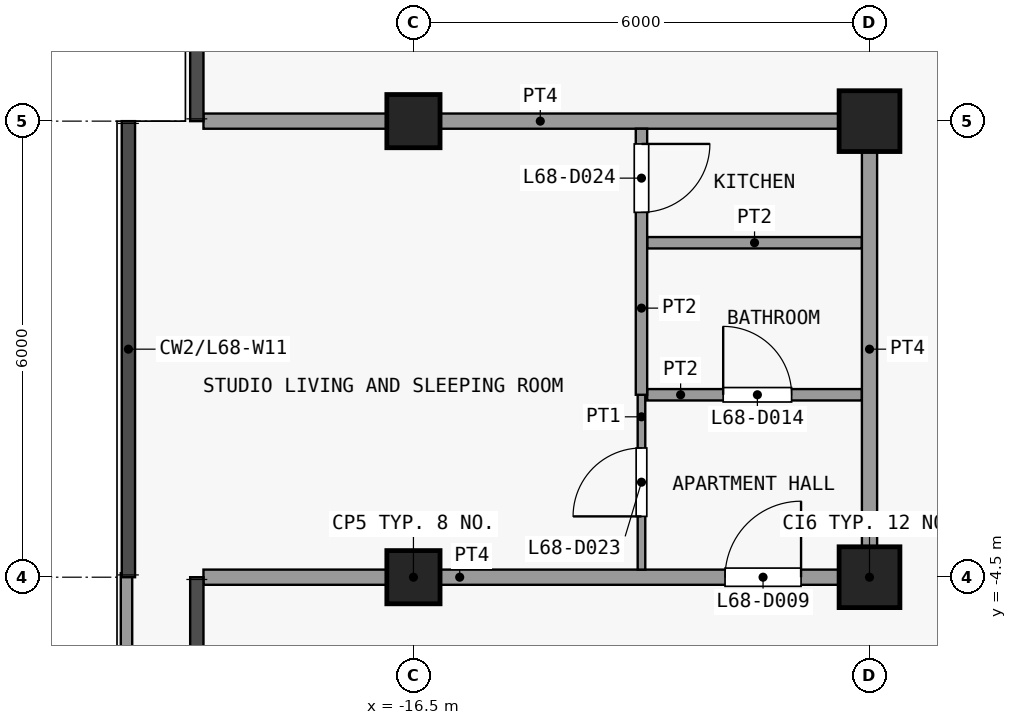
"""IFC4 building model, lengths in metres.
Left out: names, types, materials, properties, quantities, classifications, styles, units other than length and angle.
Written with IfcOpenShell. Run it as: python <this file> out.ifc"""

import sys

from ifc_helpers import new_model, si_unit, direction, frame, frame_2d, origin, origin_2d, place, context, subcontext, project, spatial, rectangle, extrude, element, fill, save


model = new_model("IFC4")
c1 = context("Model", 3, precision=1e-05, world=origin(), true_north=direction((0.0, 1.0)))
c2 = subcontext(c1, "Body", "Model", "MODEL_VIEW")
j1 = project(units=[si_unit("LENGTHUNIT", "METRE"), si_unit("PLANEANGLEUNIT", "RADIAN")], contexts=[c1])
p1 = place(None, origin())
s1 = spatial("IfcSite", under=j1, at=p1, CompositionType="ELEMENT")
p2 = place(p1, origin())
s2 = spatial("IfcBuilding", under=s1, at=p2, CompositionType="ELEMENT")
p3 = place(p2, frame((0.0, 0.0, 269.9)))
s3 = spatial("IfcBuildingStorey", under=s2, at=p3, CompositionType="ELEMENT", Elevation=269.9)
for number, where, z_axis, x_axis in (
    (1, (-16.5, -4.5, 0.0), (0.0, 0.0, 1.0), (1.0, 0.0, 0.0)),
    (2, (-16.5, 1.5, 0.0), (0.0, 0.0, 1.0), (1.0, 0.0, 0.0)),
):
    element("IfcColumn", number, at=place(p3, frame(where, z_axis=z_axis, x_axis=x_axis)), inside=s3, PredefinedType="COLUMN", context=c2, shape_type="SweptSolid", body=[
        extrude(rectangle(XDim=0.7, YDim=0.7, at=origin_2d()), origin(), (0.0, 0.0, 1.0), 3.6),
    ])
for number, where, z_axis, x_axis in (
    (3, (-10.5, -4.5, 0.0), (0.0, 0.0, 1.0), (1.0, 0.0, 0.0)),
    (4, (-10.5, 1.5, 0.0), (0.0, 0.0, 1.0), (1.0, 0.0, 0.0)),
):
    element("IfcColumn", number, at=place(p3, frame(where, z_axis=z_axis, x_axis=x_axis)), inside=s3, PredefinedType="COLUMN", context=c2, shape_type="SweptSolid", body=[
        extrude(rectangle(XDim=0.8, YDim=0.8, at=origin_2d()), origin(), (0.0, 0.0, 1.0), 3.6),
    ])
p4 = place(p3, frame((-20.275, -13.3, 0.0), z_axis=(0.0, 0.0, 1.0), x_axis=(0.0, 1.0, 0.0)))
e5 = element("IfcWall", 5, at=p4, inside=s3, PredefinedType="PARAPET", context=c2, shape_type="SweptSolid", body=[
    extrude(rectangle(XDim=8.853, YDim=0.15, at=frame_2d((4.426, 0.0))), origin(), (0.0, 0.0, 1.0), 1.15),
])
p5 = place(p3, frame((-19.262, -4.5, 0.0), z_axis=(0.0, 0.0, 1.0), x_axis=(1.0, 0.0, 0.0)))
e6 = element("IfcWall", 6, at=p5, inside=s3, PredefinedType="PARTITIONING", context=c2, shape_type="SweptSolid", body=[
    extrude(rectangle(XDim=8.863, YDim=0.2, at=frame_2d((4.431, 0.0))), origin(), (0.0, 0.0, 1.0), 3.3),
])
p6 = place(p5, frame((6.862, 0.0, 0.0)))
e7 = element("IfcOpeningElement", 7, at=p6, cuts=e6, PredefinedType="OPENING", context=c2, shape_type="SweptSolid", body=[
    extrude(rectangle(XDim=1.0, YDim=2.1, at=frame_2d((0.5, 1.05))), frame((0.0, 0.11, 0.0), z_axis=(0.0, -1.0, 0.0), x_axis=(1.0, 0.0, 0.0)), (0.0, 0.0, 1.0), 0.22),
])
p7 = place(p3, frame((-13.425, -2.1, 0.0), z_axis=(0.0, 0.0, 1.0), x_axis=(1.0, 0.0, 0.0)))
e8 = element("IfcWall", 8, at=p7, inside=s3, PredefinedType="PARTITIONING", context=c2, shape_type="SweptSolid", body=[
    extrude(rectangle(XDim=2.825, YDim=0.15, at=frame_2d((1.413, 0.0))), origin(), (0.0, 0.0, 1.0), 3.3),
])
p8 = place(p7, frame((1.0, 0.0, 0.0)))
e9 = element("IfcOpeningElement", 9, at=p8, cuts=e8, PredefinedType="OPENING", context=c2, shape_type="SweptSolid", body=[
    extrude(rectangle(XDim=0.9, YDim=2.1, at=frame_2d((0.45, 1.05))), frame((0.0, 0.085, 0.0), z_axis=(0.0, -1.0, 0.0), x_axis=(1.0, 0.0, 0.0)), (0.0, 0.0, 1.0), 0.17),
])
p9 = place(p3, frame((-13.425, -0.1, 0.0), z_axis=(0.0, 0.0, 1.0), x_axis=(1.0, 0.0, 0.0)))
e10 = element("IfcWall", 10, at=p9, inside=s3, PredefinedType="PARTITIONING", context=c2, shape_type="SweptSolid", body=[
    extrude(rectangle(XDim=2.825, YDim=0.15, at=frame_2d((1.413, 0.0))), origin(), (0.0, 0.0, 1.0), 3.3),
])
p10 = place(p3, frame((-19.262, 1.5, 0.0), z_axis=(0.0, 0.0, 1.0), x_axis=(1.0, 0.0, 0.0)))
e11 = element("IfcWall", 11, at=p10, inside=s3, PredefinedType="PARTITIONING", context=c2, shape_type="SweptSolid", body=[
    extrude(rectangle(XDim=8.863, YDim=0.2, at=frame_2d((4.431, 0.0))), origin(), (0.0, 0.0, 1.0), 3.3),
])
p11 = place(p3, frame((-13.5, -4.4, 0.0), z_axis=(0.0, 0.0, 1.0), x_axis=(0.0, 1.0, 0.0)))
e12 = element("IfcWall", 12, at=p11, inside=s3, PredefinedType="PARTITIONING", context=c2, shape_type="SweptSolid", body=[
    extrude(rectangle(XDim=2.3, YDim=0.1, at=frame_2d((1.15, 0.0))), origin(), (0.0, 0.0, 1.0), 3.3),
])
p12 = place(p11, frame((0.7, 0.0, 0.0)))
e13 = element("IfcOpeningElement", 13, at=p12, cuts=e12, PredefinedType="OPENING", context=c2, shape_type="SweptSolid", body=[
    extrude(rectangle(XDim=0.9, YDim=2.1, at=frame_2d((0.45, 1.05))), frame((0.0, 0.06, 0.0), z_axis=(0.0, -1.0, 0.0), x_axis=(1.0, 0.0, 0.0)), (0.0, 0.0, 1.0), 0.12),
])
p13 = place(p3, frame((-13.5, -2.1, 0.0), z_axis=(0.0, 0.0, 1.0), x_axis=(0.0, 1.0, 0.0)))
e14 = element("IfcWall", 14, at=p13, inside=s3, PredefinedType="PARTITIONING", context=c2, shape_type="SweptSolid", body=[
    extrude(rectangle(XDim=3.5, YDim=0.15, at=frame_2d((1.75, 0.0))), origin(), (0.0, 0.0, 1.0), 3.3),
])
p14 = place(p13, frame((2.4, 0.0, 0.0)))
e15 = element("IfcOpeningElement", 15, at=p14, cuts=e14, PredefinedType="OPENING", context=c2, shape_type="SweptSolid", body=[
    extrude(rectangle(XDim=0.9, YDim=2.1, at=frame_2d((0.45, 1.05))), frame((0.0, 0.085, 0.0), z_axis=(0.0, -1.0, 0.0), x_axis=(1.0, 0.0, 0.0)), (0.0, 0.0, 1.0), 0.17),
])
p15 = place(p3, frame((-10.5, -4.4, 0.0), z_axis=(0.0, 0.0, 1.0), x_axis=(0.0, 1.0, 0.0)))
e16 = element("IfcWall", 16, at=p15, inside=s3, PredefinedType="PARTITIONING", context=c2, shape_type="SweptSolid", body=[
    extrude(rectangle(XDim=5.8, YDim=0.2, at=frame_2d((2.9, 0.0))), origin(), (0.0, 0.0, 1.0), 3.3),
])
p16 = place(p6, origin())
e17 = element("IfcDoor", 17, at=p16, inside=s3, OperationType="SINGLE_SWING_LEFT", PredefinedType="DOOR", context=c2, shape_type="SweptSolid", body=[
    extrude(rectangle(XDim=1.0, YDim=2.1, at=frame_2d((0.5, 1.05))), frame((0.0, 0.025, 0.0), z_axis=(0.0, -1.0, 0.0), x_axis=(1.0, 0.0, 0.0)), (0.0, 0.0, 1.0), 0.05),
])
fill(e7, e17)
p17 = place(p8, origin())
e18 = element("IfcDoor", 18, at=p17, inside=s3, OperationType="SINGLE_SWING_RIGHT", PredefinedType="DOOR", context=c2, shape_type="SweptSolid", body=[
    extrude(rectangle(XDim=0.9, YDim=2.1, at=frame_2d((0.45, 1.05))), frame((0.0, 0.025, 0.0), z_axis=(0.0, -1.0, 0.0), x_axis=(1.0, 0.0, 0.0)), (0.0, 0.0, 1.0), 0.05),
])
fill(e9, e18)
p18 = place(p12, origin())
e19 = element("IfcDoor", 19, at=p18, inside=s3, OperationType="SINGLE_SWING_RIGHT", PredefinedType="DOOR", context=c2, shape_type="SweptSolid", body=[
    extrude(rectangle(XDim=0.9, YDim=2.1, at=frame_2d((0.45, 1.05))), frame((0.0, 0.025, 0.0), z_axis=(0.0, -1.0, 0.0), x_axis=(1.0, 0.0, 0.0)), (0.0, 0.0, 1.0), 0.05),
])
fill(e13, e19)
p19 = place(p14, origin())
e20 = element("IfcDoor", 20, at=p19, inside=s3, OperationType="SINGLE_SWING_RIGHT", PredefinedType="DOOR", context=c2, shape_type="SweptSolid", body=[
    extrude(rectangle(XDim=0.9, YDim=2.1, at=frame_2d((0.45, 1.05))), frame((0.0, 0.025, 0.0), z_axis=(0.0, -1.0, 0.0), x_axis=(1.0, 0.0, 0.0)), (0.0, 0.0, 1.0), 0.05),
])
fill(e15, e20)
save(model, sys.argv[1])
